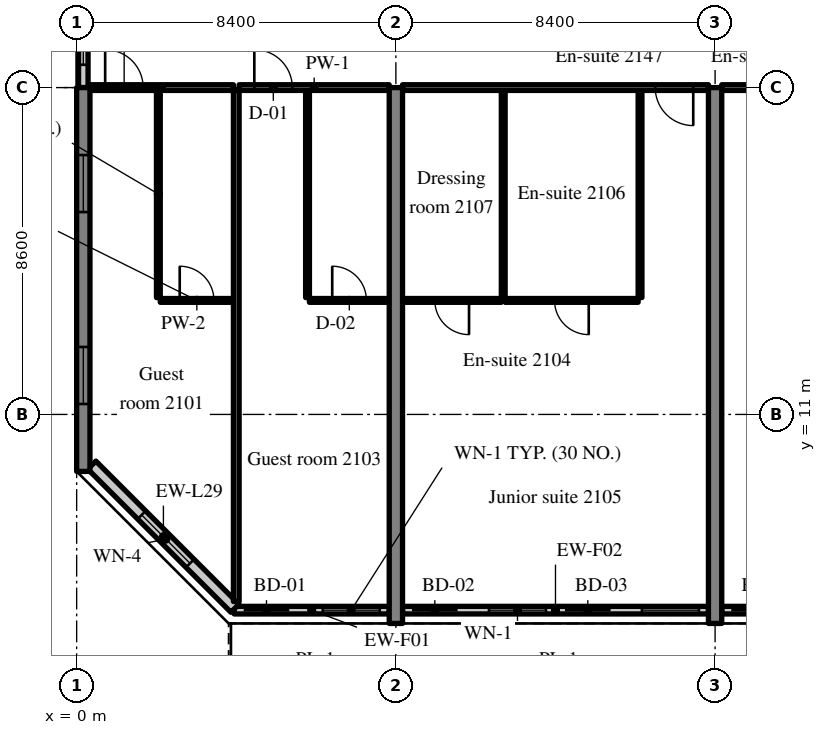
"""IFC4 building model, lengths in metres.
Left out: names, types, materials, properties, quantities, classifications, styles, units other than length and angle.
Written with IfcOpenShell. Run it as: python <this file> out.ifc"""

import sys

from ifc_helpers import new_model, si_unit, direction, frame, frame_2d, origin, place, context, subcontext, project, spatial, rectangle, extrude, source, transform, mapped, element, fill, save


model = new_model("IFC4")
c1 = context("Model", 3, precision=1e-05, world=origin(), true_north=direction((0.0, 1.0)))
c2 = subcontext(c1, "Body", "Model", "MODEL_VIEW")
j1 = project(units=[si_unit("LENGTHUNIT", "METRE"), si_unit("PLANEANGLEUNIT", "RADIAN")], contexts=[c1])
p1 = place(None, origin())
s1 = spatial("IfcSite", under=j1, at=p1, CompositionType="ELEMENT")
p2 = place(p1, origin())
s2 = spatial("IfcBuilding", under=s1, at=p2, CompositionType="ELEMENT")
p3 = place(p2, frame((0.0, 0.0, 91.4)))
s3 = spatial("IfcBuildingStorey", under=s2, at=p3, CompositionType="ELEMENT", Elevation=91.4)
m1 = source(origin(), c2, "Body", "SweptSolid", [
    extrude(rectangle(XDim=10.1, YDim=0.35, at=frame_2d((5.05, 0.0))), origin(), (0.0, 0.0, 1.0), 3.52),
])
p4 = place(p3, frame((0.175, 9.5, 0.0), z_axis=(0.0, 0.0, 1.0), x_axis=(0.0, 1.0, 0.0)))
e1 = element("IfcWall", 1, at=p4, inside=s3, PredefinedType="SHEAR", context=c2, shape_type="MappedRepresentation", body=[
    mapped(m1, transform((0.0, 0.0, 0.0), scale=1.0)),
])
m2 = source(origin(), c2, "Body", "SweptSolid", [
    extrude(rectangle(XDim=1.5, YDim=1.5, at=frame_2d((0.75, 0.75))), frame((0.0, 0.185, 0.0), z_axis=(0.0, -1.0, 0.0), x_axis=(1.0, 0.0, 0.0)), (0.0, 0.0, 1.0), 0.37),
])
p5 = place(p4, frame((1.775, 0.0, 0.9)))
e2 = element("IfcOpeningElement", 2, at=p5, cuts=e1, PredefinedType="OPENING", context=c2, shape_type="MappedRepresentation", body=[
    mapped(m2, transform((0.0, 0.0, 0.0), scale=1.0)),
])
p6 = place(p4, frame((6.825, 0.0, 0.9)))
e3 = element("IfcOpeningElement", 3, at=p6, cuts=e1, PredefinedType="OPENING", context=c2, shape_type="MappedRepresentation", body=[
    mapped(m2, transform((0.0, 0.0, 0.0), scale=1.0)),
])
m3 = source(origin(), c2, "Body", "SweptSolid", [
    extrude(rectangle(XDim=14.1, YDim=0.35, at=frame_2d((7.05, 0.0))), origin(), (0.0, 0.0, 1.0), 3.52),
])
for number, where, z_axis, x_axis in (
    (4, (8.4, 5.5, 0.0), (0.0, 0.0, 1.0), (0.0, 1.0, 0.0)),
    (5, (16.8, 5.5, 0.0), (0.0, 0.0, 1.0), (0.0, 1.0, 0.0)),
):
    element("IfcWall", number, at=place(p3, frame(where, z_axis=z_axis, x_axis=x_axis)), inside=s3, PredefinedType="SHEAR", context=c2, shape_type="MappedRepresentation", body=[
        mapped(m3, transform((0.0, 0.0, 0.0), scale=1.0)),
    ])
m4 = source(origin(), c2, "Body", "SweptSolid", [
    extrude(rectangle(XDim=4.08, YDim=0.2, at=frame_2d((2.04, 0.0))), origin(), (0.0, 0.0, 1.0), 2.82),
])
p7 = place(p3, frame((4.145, 5.85, 0.0), z_axis=(0.0, 0.0, 1.0), x_axis=(1.0, 0.0, 0.0)))
e6 = element("IfcWall", 6, at=p7, inside=s3, PredefinedType="SOLIDWALL", context=c2, shape_type="MappedRepresentation", body=[
    mapped(m4, transform((0.0, 0.0, 0.0), scale=1.0)),
])
m5 = source(origin(), c2, "Body", "SweptSolid", [
    extrude(rectangle(XDim=1.2, YDim=2.4, at=frame_2d((0.6, 1.2))), frame((0.0, 0.11, 0.0), z_axis=(0.0, -1.0, 0.0), x_axis=(1.0, 0.0, 0.0)), (0.0, 0.0, 1.0), 0.22),
])
p8 = place(p7, frame((0.25, 0.0, 0.0)))
e7 = element("IfcOpeningElement", 7, at=p8, cuts=e6, PredefinedType="OPENING", context=c2, shape_type="MappedRepresentation", body=[
    mapped(m5, transform((0.0, 0.0, 0.0), scale=1.0)),
])
m6 = source(origin(), c2, "Body", "SweptSolid", [
    extrude(rectangle(XDim=1.5, YDim=1.5, at=frame_2d((0.75, 0.75))), frame((0.0, 0.11, 0.0), z_axis=(0.0, -1.0, 0.0), x_axis=(1.0, 0.0, 0.0)), (0.0, 0.0, 1.0), 0.22),
])
p9 = place(p7, frame((2.33, 0.0, 0.9)))
e8 = element("IfcOpeningElement", 8, at=p9, cuts=e6, PredefinedType="OPENING", context=c2, shape_type="MappedRepresentation", body=[
    mapped(m6, transform((0.0, 0.0, 0.0), scale=1.0)),
])
m7 = source(origin(), c2, "Body", "SweptSolid", [
    extrude(rectangle(XDim=8.05, YDim=0.2, at=frame_2d((4.025, 0.0))), origin(), (0.0, 0.0, 1.0), 2.82),
])
p10 = place(p3, frame((8.575, 5.85, 0.0), z_axis=(0.0, 0.0, 1.0), x_axis=(1.0, 0.0, 0.0)))
e9 = element("IfcWall", 9, at=p10, inside=s3, PredefinedType="SOLIDWALL", context=c2, shape_type="MappedRepresentation", body=[
    mapped(m7, transform((0.0, 0.0, 0.0), scale=1.0)),
])
p11 = place(p10, frame((0.25, 0.0, 0.0)))
e10 = element("IfcOpeningElement", 10, at=p11, cuts=e9, PredefinedType="OPENING", context=c2, shape_type="MappedRepresentation", body=[
    mapped(m5, transform((0.0, 0.0, 0.0), scale=1.0)),
])
p12 = place(p10, frame((2.275, 0.0, 0.9)))
e11 = element("IfcOpeningElement", 11, at=p12, cuts=e9, PredefinedType="OPENING", context=c2, shape_type="MappedRepresentation", body=[
    mapped(m6, transform((0.0, 0.0, 0.0), scale=1.0)),
])
p13 = place(p10, frame((4.275, 0.0, 0.0)))
e12 = element("IfcOpeningElement", 12, at=p13, cuts=e9, PredefinedType="OPENING", context=c2, shape_type="MappedRepresentation", body=[
    mapped(m5, transform((0.0, 0.0, 0.0), scale=1.0)),
])
p14 = place(p10, frame((6.3, 0.0, 0.9)))
e13 = element("IfcOpeningElement", 13, at=p14, cuts=e9, PredefinedType="OPENING", context=c2, shape_type="MappedRepresentation", body=[
    mapped(m6, transform((0.0, 0.0, 0.0), scale=1.0)),
])
m8 = source(origin(), c2, "Body", "SweptSolid", [
    extrude(rectangle(XDim=8.05, YDim=0.2, at=frame_2d((4.025, 0.0))), origin(), (0.0, 0.0, 1.0), 2.82),
])
p15 = place(p3, frame((16.975, 5.85, 0.0), z_axis=(0.0, 0.0, 1.0), x_axis=(1.0, 0.0, 0.0)))
e14 = element("IfcWall", 14, at=p15, inside=s3, PredefinedType="SOLIDWALL", context=c2, shape_type="MappedRepresentation", body=[
    mapped(m8, transform((0.0, 0.0, 0.0), scale=1.0)),
])
p16 = place(p15, frame((0.25, 0.0, 0.0)))
e15 = element("IfcOpeningElement", 15, at=p16, cuts=e14, PredefinedType="OPENING", context=c2, shape_type="MappedRepresentation", body=[
    mapped(m5, transform((0.0, 0.0, 0.0), scale=1.0)),
])
p17 = place(p15, frame((2.275, 0.0, 0.9)))
e16 = element("IfcOpeningElement", 16, at=p17, cuts=e14, PredefinedType="OPENING", context=c2, shape_type="MappedRepresentation", body=[
    mapped(m6, transform((0.0, 0.0, 0.0), scale=1.0)),
])
p18 = place(p15, frame((4.275, 0.0, 0.0)))
e17 = element("IfcOpeningElement", 17, at=p18, cuts=e14, PredefinedType="OPENING", context=c2, shape_type="MappedRepresentation", body=[
    mapped(m5, transform((0.0, 0.0, 0.0), scale=1.0)),
])
p19 = place(p15, frame((6.3, 0.0, 0.9)))
e18 = element("IfcOpeningElement", 18, at=p19, cuts=e14, PredefinedType="OPENING", context=c2, shape_type="MappedRepresentation", body=[
    mapped(m6, transform((0.0, 0.0, 0.0), scale=1.0)),
])
m9 = source(origin(), c2, "Body", "SweptSolid", [
    extrude(rectangle(XDim=5.326, YDim=0.3, at=frame_2d((2.663, 0.0))), origin(), (0.0, 0.0, 1.0), 3.52),
])
p20 = place(p3, frame((0.4, 9.666, 0.0), z_axis=(0.0, 0.0, 1.0), x_axis=(0.707106781187, -0.707106781187, 0.0)))
e19 = element("IfcWall", 19, at=p20, inside=s3, PredefinedType="SOLIDWALL", context=c2, shape_type="MappedRepresentation", body=[
    mapped(m9, transform((0.0, 0.0, 0.0), scale=1.0)),
])
m10 = source(origin(), c2, "Body", "SweptSolid", [
    extrude(rectangle(XDim=1.8, YDim=1.5, at=frame_2d((0.9, 0.75))), frame((0.0, 0.16, 0.0), z_axis=(0.0, -1.0, 0.0), x_axis=(1.0, 0.0, 0.0)), (0.0, 0.0, 1.0), 0.32),
])
p21 = place(p20, frame((1.854, 0.0, 0.9)))
e20 = element("IfcOpeningElement", 20, at=p21, cuts=e19, PredefinedType="OPENING", context=c2, shape_type="MappedRepresentation", body=[
    mapped(m10, transform((0.0, 0.0, 0.0), scale=1.0)),
])
m11 = source(origin(), c2, "Body", "SweptSolid", [
    extrude(rectangle(XDim=2.4, YDim=0.25, at=frame_2d((1.2, 0.0))), origin(), (0.0, 0.0, 1.0), 2.62),
])
p22 = place(p3, frame((0.175, 19.6, 0.0), z_axis=(0.0, 0.0, 1.0), x_axis=(0.0, 1.0, 0.0)))
e21 = element("IfcWall", 21, at=p22, inside=s3, PredefinedType="SOLIDWALL", context=c2, shape_type="MappedRepresentation", body=[
    mapped(m11, transform((0.0, 0.0, 0.0), scale=1.0)),
])
m12 = source(origin(), c2, "Body", "SweptSolid", [
    extrude(rectangle(XDim=1.2, YDim=1.5, at=frame_2d((0.6, 0.75))), frame((0.0, 0.135, 0.0), z_axis=(0.0, -1.0, 0.0), x_axis=(1.0, 0.0, 0.0)), (0.0, 0.0, 1.0), 0.27),
])
p23 = place(p22, frame((0.6, 0.0, 0.9)))
e22 = element("IfcOpeningElement", 22, at=p23, cuts=e21, PredefinedType="OPENING", context=c2, shape_type="MappedRepresentation", body=[
    mapped(m12, transform((0.0, 0.0, 0.0), scale=1.0)),
])
m13 = source(origin(), c2, "Body", "SweptSolid", [
    extrude(rectangle(XDim=5.45, YDim=0.1, at=frame_2d((2.725, 0.0))), origin(), (0.0, 0.0, 1.0), 3.52),
])
p24 = place(p3, frame((2.15, 14.075, 0.0), z_axis=(0.0, 0.0, 1.0), x_axis=(0.0, 1.0, 0.0)))
e23 = element("IfcWall", 23, at=p24, inside=s3, PredefinedType="PARTITIONING", context=c2, shape_type="MappedRepresentation", body=[
    mapped(m13, transform((0.0, 0.0, 0.0), scale=1.0)),
])
m14 = source(origin(), c2, "Body", "SweptSolid", [
    extrude(rectangle(XDim=1.925, YDim=0.1, at=frame_2d((0.962, 0.0))), origin(), (0.0, 0.0, 1.0), 3.52),
])
p25 = place(p3, frame((2.2, 14.0, 0.0), z_axis=(0.0, 0.0, 1.0), x_axis=(1.0, 0.0, 0.0)))
e24 = element("IfcWall", 24, at=p25, inside=s3, PredefinedType="PARTITIONING", context=c2, shape_type="MappedRepresentation", body=[
    mapped(m14, transform((0.0, 0.0, 0.0), scale=1.0)),
])
m15 = source(origin(), c2, "Body", "SweptSolid", [
    extrude(rectangle(XDim=0.9, YDim=2.1, at=frame_2d((0.45, 1.05))), frame((0.0, 0.06, 0.0), z_axis=(0.0, -1.0, 0.0), x_axis=(1.0, 0.0, 0.0)), (0.0, 0.0, 1.0), 0.12),
])
p26 = place(p25, frame((0.512, 0.0, 0.0)))
e25 = element("IfcOpeningElement", 25, at=p26, cuts=e24, PredefinedType="OPENING", context=c2, shape_type="MappedRepresentation", body=[
    mapped(m15, transform((0.0, 0.0, 0.0), scale=1.0)),
])
m16 = source(origin(), c2, "Body", "SweptSolid", [
    extrude(rectangle(XDim=3.775, YDim=0.15, at=frame_2d((1.887, 0.0))), origin(), (0.0, 0.0, 1.0), 2.82),
])
p27 = place(p3, frame((0.35, 19.6, 0.0), z_axis=(0.0, 0.0, 1.0), x_axis=(1.0, 0.0, 0.0)))
e26 = element("IfcWall", 26, at=p27, inside=s3, PredefinedType="PARTITIONING", context=c2, shape_type="MappedRepresentation", body=[
    mapped(m16, transform((0.0, 0.0, 0.0), scale=1.0)),
])
m17 = source(origin(), c2, "Body", "SweptSolid", [
    extrude(rectangle(XDim=1.0, YDim=2.1, at=frame_2d((0.5, 1.05))), frame((0.0, 0.085, 0.0), z_axis=(0.0, -1.0, 0.0), x_axis=(1.0, 0.0, 0.0)), (0.0, 0.0, 1.0), 0.17),
])
p28 = place(p27, frame((0.4, 0.0, 0.0)))
e27 = element("IfcOpeningElement", 27, at=p28, cuts=e26, PredefinedType="OPENING", context=c2, shape_type="MappedRepresentation", body=[
    mapped(m17, transform((0.0, 0.0, 0.0), scale=1.0)),
])
p29 = place(p3, frame((6.075, 14.075, 0.0), z_axis=(0.0, 0.0, 1.0), x_axis=(0.0, 1.0, 0.0)))
e28 = element("IfcWall", 28, at=p29, inside=s3, PredefinedType="PARTITIONING", context=c2, shape_type="MappedRepresentation", body=[
    mapped(m13, transform((0.0, 0.0, 0.0), scale=1.0)),
])
m18 = source(origin(), c2, "Body", "SweptSolid", [
    extrude(rectangle(XDim=2.1, YDim=0.1, at=frame_2d((1.05, 0.0))), origin(), (0.0, 0.0, 1.0), 3.52),
])
p30 = place(p3, frame((6.125, 14.0, 0.0), z_axis=(0.0, 0.0, 1.0), x_axis=(1.0, 0.0, 0.0)))
e29 = element("IfcWall", 29, at=p30, inside=s3, PredefinedType="PARTITIONING", context=c2, shape_type="MappedRepresentation", body=[
    mapped(m18, transform((0.0, 0.0, 0.0), scale=1.0)),
])
p31 = place(p30, frame((0.6, 0.0, 0.0)))
e30 = element("IfcOpeningElement", 30, at=p31, cuts=e29, PredefinedType="OPENING", context=c2, shape_type="MappedRepresentation", body=[
    mapped(m15, transform((0.0, 0.0, 0.0), scale=1.0)),
])
m19 = source(origin(), c2, "Body", "SweptSolid", [
    extrude(rectangle(XDim=3.95, YDim=0.15, at=frame_2d((1.975, 0.0))), origin(), (0.0, 0.0, 1.0), 2.82),
])
p32 = place(p3, frame((4.275, 19.6, 0.0), z_axis=(0.0, 0.0, 1.0), x_axis=(1.0, 0.0, 0.0)))
e31 = element("IfcWall", 31, at=p32, inside=s3, PredefinedType="PARTITIONING", context=c2, shape_type="MappedRepresentation", body=[
    mapped(m19, transform((0.0, 0.0, 0.0), scale=1.0)),
])
p33 = place(p32, frame((0.4, 0.0, 0.0)))
e32 = element("IfcOpeningElement", 32, at=p33, cuts=e31, PredefinedType="OPENING", context=c2, shape_type="MappedRepresentation", body=[
    mapped(m17, transform((0.0, 0.0, 0.0), scale=1.0)),
])
m20 = source(origin(), c2, "Body", "SweptSolid", [
    extrude(rectangle(XDim=13.447, YDim=0.15, at=frame_2d((6.724, 0.0))), origin(), (0.0, 0.0, 1.0), 3.52),
])
p34 = place(p3, frame((4.2, 6.078, 0.0), z_axis=(0.0, 0.0, 1.0), x_axis=(0.0, 1.0, 0.0)))
e33 = element("IfcWall", 33, at=p34, inside=s3, PredefinedType="PARTITIONING", context=c2, shape_type="MappedRepresentation", body=[
    mapped(m20, transform((0.0, 0.0, 0.0), scale=1.0)),
])
for number, where, z_axis, x_axis in (
    (34, (14.825, 14.075, 0.0), (0.0, 0.0, 1.0), (0.0, 1.0, 0.0)),
    (35, (11.225, 14.075, 0.0), (0.0, 0.0, 1.0), (0.0, 1.0, 0.0)),
):
    element("IfcWall", number, at=place(p3, frame(where, z_axis=z_axis, x_axis=x_axis)), inside=s3, PredefinedType="PARTITIONING", context=c2, shape_type="MappedRepresentation", body=[
        mapped(m13, transform((0.0, 0.0, 0.0), scale=1.0)),
    ])
m21 = source(origin(), c2, "Body", "SweptSolid", [
    extrude(rectangle(XDim=3.5, YDim=0.1, at=frame_2d((1.75, 0.0))), origin(), (0.0, 0.0, 1.0), 3.52),
])
p35 = place(p3, frame((11.275, 14.0, 0.0), z_axis=(0.0, 0.0, 1.0), x_axis=(1.0, 0.0, 0.0)))
e36 = element("IfcWall", 36, at=p35, inside=s3, PredefinedType="PARTITIONING", context=c2, shape_type="MappedRepresentation", body=[
    mapped(m21, transform((0.0, 0.0, 0.0), scale=1.0)),
])
p36 = place(p35, frame((1.3, 0.0, 0.0)))
e37 = element("IfcOpeningElement", 37, at=p36, cuts=e36, PredefinedType="OPENING", context=c2, shape_type="MappedRepresentation", body=[
    mapped(m15, transform((0.0, 0.0, 0.0), scale=1.0)),
])
m22 = source(origin(), c2, "Body", "SweptSolid", [
    extrude(rectangle(XDim=2.6, YDim=0.1, at=frame_2d((1.3, 0.0))), origin(), (0.0, 0.0, 1.0), 3.52),
])
p37 = place(p3, frame((8.575, 14.0, 0.0), z_axis=(0.0, 0.0, 1.0), x_axis=(1.0, 0.0, 0.0)))
e38 = element("IfcWall", 38, at=p37, inside=s3, PredefinedType="PARTITIONING", context=c2, shape_type="MappedRepresentation", body=[
    mapped(m22, transform((0.0, 0.0, 0.0), scale=1.0)),
])
p38 = place(p37, frame((0.85, 0.0, 0.0)))
e39 = element("IfcOpeningElement", 39, at=p38, cuts=e38, PredefinedType="OPENING", context=c2, shape_type="MappedRepresentation", body=[
    mapped(m15, transform((0.0, 0.0, 0.0), scale=1.0)),
])
m23 = source(origin(), c2, "Body", "SweptSolid", [
    extrude(rectangle(XDim=8.05, YDim=0.15, at=frame_2d((4.025, 0.0))), origin(), (0.0, 0.0, 1.0), 2.82),
])
p39 = place(p3, frame((8.575, 19.6, 0.0), z_axis=(0.0, 0.0, 1.0), x_axis=(1.0, 0.0, 0.0)))
e40 = element("IfcWall", 40, at=p39, inside=s3, PredefinedType="PARTITIONING", context=c2, shape_type="MappedRepresentation", body=[
    mapped(m23, transform((0.0, 0.0, 0.0), scale=1.0)),
])
p40 = place(p39, frame((6.65, 0.0, 0.0)))
e41 = element("IfcOpeningElement", 41, at=p40, cuts=e40, PredefinedType="OPENING", context=c2, shape_type="MappedRepresentation", body=[
    mapped(m17, transform((0.0, 0.0, 0.0), scale=1.0)),
])
m24 = source(origin(), c2, "Body", "SweptSolid", [
    extrude(rectangle(XDim=8.05, YDim=0.15, at=frame_2d((4.025, 0.0))), origin(), (0.0, 0.0, 1.0), 2.82),
])
p41 = place(p3, frame((16.975, 19.6, 0.0), z_axis=(0.0, 0.0, 1.0), x_axis=(1.0, 0.0, 0.0)))
e42 = element("IfcWall", 42, at=p41, inside=s3, PredefinedType="PARTITIONING", context=c2, shape_type="MappedRepresentation", body=[
    mapped(m24, transform((0.0, 0.0, 0.0), scale=1.0)),
])
m25 = source(origin(), c2, "Body", "SweptSolid", [
    extrude(rectangle(XDim=1.8, YDim=2.1, at=frame_2d((0.9, 1.05))), frame((0.0, 0.085, 0.0), z_axis=(0.0, -1.0, 0.0), x_axis=(1.0, 0.0, 0.0)), (0.0, 0.0, 1.0), 0.17),
])
p42 = place(p41, frame((3.125, 0.0, 0.0)))
e43 = element("IfcOpeningElement", 43, at=p42, cuts=e42, PredefinedType="OPENING", context=c2, shape_type="MappedRepresentation", body=[
    mapped(m25, transform((0.0, 0.0, 0.0), scale=1.0)),
])
m26 = source(origin(), c2, "Body", "SweptSolid", [
    extrude(rectangle(XDim=1.2, YDim=2.4, at=frame_2d((0.6, 1.2))), frame((0.0, 0.025, 0.0), z_axis=(0.0, -1.0, 0.0), x_axis=(1.0, 0.0, 0.0)), (0.0, 0.0, 1.0), 0.05),
])
p43 = place(p8, origin())
e44 = element("IfcDoor", 44, at=p43, inside=s3, OperationType="SLIDING_TO_LEFT", PredefinedType="DOOR", context=c2, shape_type="MappedRepresentation", body=[
    mapped(m26, transform((0.0, 0.0, 0.0), scale=1.0)),
])
fill(e7, e44)
m27 = source(origin(), c2, "Body", "SweptSolid", [
    extrude(rectangle(XDim=1.5, YDim=1.5, at=frame_2d((0.75, 0.75))), frame((0.0, 0.03, 0.0), z_axis=(0.0, -1.0, 0.0), x_axis=(1.0, 0.0, 0.0)), (0.0, 0.0, 1.0), 0.06),
])
p44 = place(p9, origin())
e45 = element("IfcWindow", 45, at=p44, inside=s3, PartitioningType="SINGLE_PANEL", PredefinedType="WINDOW", context=c2, shape_type="MappedRepresentation", body=[
    mapped(m27, transform((0.0, 0.0, 0.0), scale=1.0)),
])
fill(e8, e45)
p45 = place(p11, origin())
e46 = element("IfcDoor", 46, at=p45, inside=s3, OperationType="SLIDING_TO_RIGHT", PredefinedType="DOOR", context=c2, shape_type="MappedRepresentation", body=[
    mapped(m26, transform((0.0, 0.0, 0.0), scale=1.0)),
])
fill(e10, e46)
p46 = place(p12, origin())
e47 = element("IfcWindow", 47, at=p46, inside=s3, PartitioningType="SINGLE_PANEL", PredefinedType="WINDOW", context=c2, shape_type="MappedRepresentation", body=[
    mapped(m27, transform((0.0, 0.0, 0.0), scale=1.0)),
])
fill(e11, e47)
p47 = place(p13, origin())
e48 = element("IfcDoor", 48, at=p47, inside=s3, OperationType="SLIDING_TO_LEFT", PredefinedType="DOOR", context=c2, shape_type="MappedRepresentation", body=[
    mapped(m26, transform((0.0, 0.0, 0.0), scale=1.0)),
])
fill(e12, e48)
p48 = place(p14, origin())
e49 = element("IfcWindow", 49, at=p48, inside=s3, PartitioningType="SINGLE_PANEL", PredefinedType="WINDOW", context=c2, shape_type="MappedRepresentation", body=[
    mapped(m27, transform((0.0, 0.0, 0.0), scale=1.0)),
])
fill(e13, e49)
p49 = place(p16, origin())
e50 = element("IfcDoor", 50, at=p49, inside=s3, OperationType="SLIDING_TO_RIGHT", PredefinedType="DOOR", context=c2, shape_type="MappedRepresentation", body=[
    mapped(m26, transform((0.0, 0.0, 0.0), scale=1.0)),
])
fill(e15, e50)
m28 = source(origin(), c2, "Body", "SweptSolid", [
    extrude(rectangle(XDim=1.8, YDim=1.5, at=frame_2d((0.9, 0.75))), frame((0.0, 0.03, 0.0), z_axis=(0.0, -1.0, 0.0), x_axis=(1.0, 0.0, 0.0)), (0.0, 0.0, 1.0), 0.06),
])
p50 = place(p21, origin())
e51 = element("IfcWindow", 51, at=p50, inside=s3, PartitioningType="SINGLE_PANEL", PredefinedType="WINDOW", context=c2, shape_type="MappedRepresentation", body=[
    mapped(m28, transform((0.0, 0.0, 0.0), scale=1.0)),
])
fill(e20, e51)
p51 = place(p5, origin())
e52 = element("IfcWindow", 52, at=p51, inside=s3, PartitioningType="SINGLE_PANEL", PredefinedType="WINDOW", context=c2, shape_type="MappedRepresentation", body=[
    mapped(m27, transform((0.0, 0.0, 0.0), scale=1.0)),
])
fill(e2, e52)
p52 = place(p6, origin())
e53 = element("IfcWindow", 53, at=p52, inside=s3, PartitioningType="SINGLE_PANEL", PredefinedType="WINDOW", context=c2, shape_type="MappedRepresentation", body=[
    mapped(m27, transform((0.0, 0.0, 0.0), scale=1.0)),
])
fill(e3, e53)
m29 = source(origin(), c2, "Body", "SweptSolid", [
    extrude(rectangle(XDim=1.2, YDim=1.5, at=frame_2d((0.6, 0.75))), frame((0.0, 0.03, 0.0), z_axis=(0.0, -1.0, 0.0), x_axis=(1.0, 0.0, 0.0)), (0.0, 0.0, 1.0), 0.06),
])
p53 = place(p23, origin())
e54 = element("IfcWindow", 54, at=p53, inside=s3, PartitioningType="SINGLE_PANEL", PredefinedType="WINDOW", context=c2, shape_type="MappedRepresentation", body=[
    mapped(m29, transform((0.0, 0.0, 0.0), scale=1.0)),
])
fill(e22, e54)
m30 = source(origin(), c2, "Body", "SweptSolid", [
    extrude(rectangle(XDim=0.9, YDim=2.1, at=frame_2d((0.45, 1.05))), frame((0.0, 0.025, 0.0), z_axis=(0.0, -1.0, 0.0), x_axis=(1.0, 0.0, 0.0)), (0.0, 0.0, 1.0), 0.05),
])
p54 = place(p26, origin())
e55 = element("IfcDoor", 55, at=p54, inside=s3, OperationType="SINGLE_SWING_LEFT", PredefinedType="DOOR", context=c2, shape_type="MappedRepresentation", body=[
    mapped(m30, transform((0.0, 0.0, 0.0), scale=1.0)),
])
fill(e25, e55)
m31 = source(origin(), c2, "Body", "SweptSolid", [
    extrude(rectangle(XDim=1.0, YDim=2.1, at=frame_2d((0.5, 1.05))), frame((0.0, 0.025, 0.0), z_axis=(0.0, -1.0, 0.0), x_axis=(1.0, 0.0, 0.0)), (0.0, 0.0, 1.0), 0.05),
])
p55 = place(p28, origin())
e56 = element("IfcDoor", 56, at=p55, inside=s3, OperationType="SINGLE_SWING_LEFT", PredefinedType="DOOR", context=c2, shape_type="MappedRepresentation", body=[
    mapped(m31, transform((0.0, 0.0, 0.0), scale=1.0)),
])
fill(e27, e56)
p56 = place(p31, origin())
e57 = element("IfcDoor", 57, at=p56, inside=s3, OperationType="SINGLE_SWING_LEFT", PredefinedType="DOOR", context=c2, shape_type="MappedRepresentation", body=[
    mapped(m30, transform((0.0, 0.0, 0.0), scale=1.0)),
])
fill(e30, e57)
p57 = place(p33, origin())
e58 = element("IfcDoor", 58, at=p57, inside=s3, OperationType="SINGLE_SWING_LEFT", PredefinedType="DOOR", context=c2, shape_type="MappedRepresentation", body=[
    mapped(m31, transform((0.0, 0.0, 0.0), scale=1.0)),
])
fill(e32, e58)
p58 = place(p36, origin())
e59 = element("IfcDoor", 59, at=p58, inside=s3, OperationType="SINGLE_SWING_RIGHT", PredefinedType="DOOR", context=c2, shape_type="MappedRepresentation", body=[
    mapped(m30, transform((0.0, 0.0, 0.0), scale=1.0)),
])
fill(e37, e59)
p59 = place(p38, origin())
e60 = element("IfcDoor", 60, at=p59, inside=s3, OperationType="SINGLE_SWING_RIGHT", PredefinedType="DOOR", context=c2, shape_type="MappedRepresentation", body=[
    mapped(m30, transform((0.0, 0.0, 0.0), scale=1.0)),
])
fill(e39, e60)
p60 = place(p40, origin())
e61 = element("IfcDoor", 61, at=p60, inside=s3, OperationType="SINGLE_SWING_RIGHT", PredefinedType="DOOR", context=c2, shape_type="MappedRepresentation", body=[
    mapped(m31, transform((0.0, 0.0, 0.0), scale=1.0)),
])
fill(e41, e61)
save(model, sys.argv[1])
